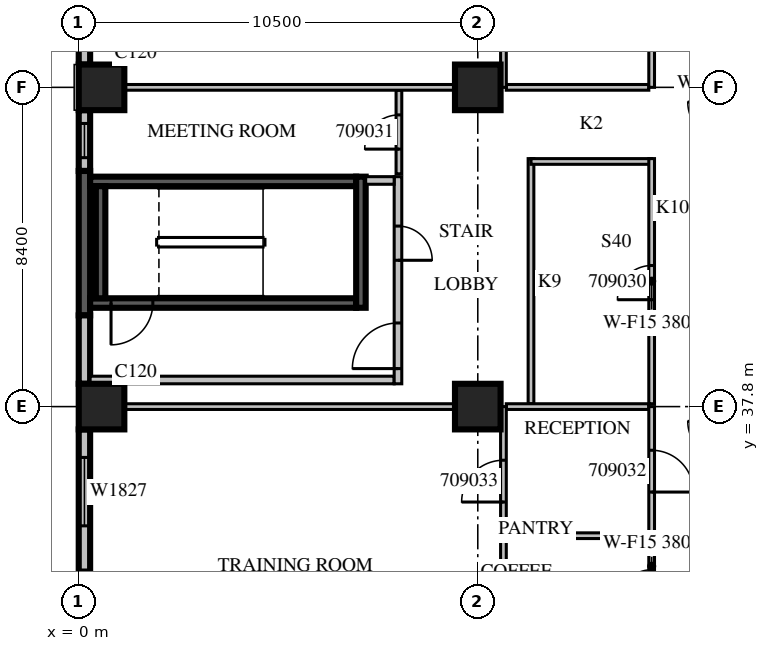
"""IFC4 building model, lengths in metres.
Left out: names, types, materials, properties, quantities, classifications, styles, units other than length and angle.
Written with IfcOpenShell. Run it as: python <this file> out.ifc"""

import sys

from ifc_helpers import new_model, si_unit, direction, frame, frame_2d, origin, origin_2d, place, context, subcontext, project, spatial, rectangle, extrude, source, transform, mapped, element, fill, save


model = new_model("IFC4")
c1 = context("Model", 3, precision=1e-05, world=origin(), true_north=direction((0.0, 1.0)))
c2 = subcontext(c1, "Body", "Model", "MODEL_VIEW")
j1 = project(units=[si_unit("LENGTHUNIT", "METRE"), si_unit("PLANEANGLEUNIT", "RADIAN")], contexts=[c1])
p1 = place(None, origin())
s1 = spatial("IfcSite", under=j1, at=p1, CompositionType="ELEMENT")
p2 = place(p1, origin())
s2 = spatial("IfcBuilding", under=s1, at=p2, CompositionType="ELEMENT")
p3 = place(p2, frame((0.0, 0.0, 48.9)))
s3 = spatial("IfcBuildingStorey", under=s2, at=p3, CompositionType="ELEMENT", Elevation=48.9)
m1 = source(origin(), c2, "Body", "SweptSolid", [
    extrude(rectangle(XDim=1.2, YDim=1.2, at=origin_2d()), origin(), (0.0, 0.0, 1.0), 4.2),
])
for number, where, z_axis, x_axis in (
    (1, (0.6, 37.8, 0.0), (0.0, 0.0, 1.0), (1.0, 0.0, 0.0)),
    (2, (10.5, 37.8, 0.0), (0.0, 0.0, 1.0), (1.0, 0.0, 0.0)),
    (3, (0.6, 46.2, 0.0), (0.0, 0.0, 1.0), (1.0, 0.0, 0.0)),
    (4, (10.5, 46.2, 0.0), (0.0, 0.0, 1.0), (1.0, 0.0, 0.0)),
):
    element("IfcColumn", number, at=place(p3, frame(where, z_axis=z_axis, x_axis=x_axis)), inside=s3, PredefinedType="COLUMN", context=c2, shape_type="MappedRepresentation", body=[
        mapped(m1, transform((0.0, 0.0, 0.0), scale=1.0)),
    ])
m2 = source(origin(), c2, "Body", "SweptSolid", [
    extrude(rectangle(XDim=4.68, YDim=0.3, at=frame_2d((2.34, 0.0))), origin(), (0.0, 0.0, 1.0), 3.8),
])
p4 = place(p3, frame((0.15, 51.48, 0.0), z_axis=(0.0, 0.0, 1.0), x_axis=(0.0, -1.0, 0.0)))
e5 = element("IfcWall", 5, at=p4, inside=s3, PredefinedType="STANDARD", context=c2, shape_type="MappedRepresentation", body=[
    mapped(m2, transform((0.0, 0.0, 0.0), scale=1.0)),
])
m3 = source(origin(), c2, "Body", "SweptSolid", [
    extrude(rectangle(XDim=1.6, YDim=0.3, at=frame_2d((0.8, 0.0))), origin(), (0.0, 0.0, 1.0), 3.8),
])
p5 = place(p3, frame((0.15, 45.6, 0.0), z_axis=(0.0, 0.0, 1.0), x_axis=(0.0, -1.0, 0.0)))
e6 = element("IfcWall", 6, at=p5, inside=s3, PredefinedType="STANDARD", context=c2, shape_type="MappedRepresentation", body=[
    mapped(m3, transform((0.0, 0.0, 0.0), scale=1.0)),
])
m4 = source(origin(), c2, "Body", "SweptSolid", [
    extrude(rectangle(XDim=0.9, YDim=2.7, at=frame_2d((0.45, 1.35))), frame((0.0, 0.16, 0.0), z_axis=(0.0, -1.0, 0.0), x_axis=(1.0, 0.0, 0.0)), (0.0, 0.0, 1.0), 0.32),
])
p6 = place(p5, frame((0.35, 0.0, 0.6)))
e7 = element("IfcOpeningElement", 7, at=p6, cuts=e6, PredefinedType="OPENING", context=c2, shape_type="MappedRepresentation", body=[
    mapped(m4, transform((0.0, 0.0, 0.0), scale=1.0)),
])
m5 = source(origin(), c2, "Body", "SweptSolid", [
    extrude(rectangle(XDim=3.8, YDim=0.3, at=frame_2d((1.9, 0.0))), origin(), (0.0, 0.0, 1.0), 3.8),
])
p7 = place(p3, frame((0.15, 44.0, 0.0), z_axis=(0.0, 0.0, 1.0), x_axis=(0.0, -1.0, 0.0)))
e8 = element("IfcWall", 8, at=p7, inside=s3, PredefinedType="SOLIDWALL", context=c2, shape_type="MappedRepresentation", body=[
    mapped(m5, transform((0.0, 0.0, 0.0), scale=1.0)),
])
m6 = source(origin(), c2, "Body", "SweptSolid", [
    extrude(rectangle(XDim=1.8, YDim=0.3, at=frame_2d((0.9, 0.0))), origin(), (0.0, 0.0, 1.0), 3.8),
])
p8 = place(p3, frame((0.15, 40.2, 0.0), z_axis=(0.0, 0.0, 1.0), x_axis=(0.0, -1.0, 0.0)))
e9 = element("IfcWall", 9, at=p8, inside=s3, PredefinedType="STANDARD", context=c2, shape_type="MappedRepresentation", body=[
    mapped(m6, transform((0.0, 0.0, 0.0), scale=1.0)),
])
m7 = source(origin(), c2, "Body", "SweptSolid", [
    extrude(rectangle(XDim=7.2, YDim=0.3, at=frame_2d((3.6, 0.0))), origin(), (0.0, 0.0, 1.0), 3.8),
])
p9 = place(p3, frame((0.15, 37.2, 0.0), z_axis=(0.0, 0.0, 1.0), x_axis=(0.0, -1.0, 0.0)))
e10 = element("IfcWall", 10, at=p9, inside=s3, PredefinedType="STANDARD", context=c2, shape_type="MappedRepresentation", body=[
    mapped(m7, transform((0.0, 0.0, 0.0), scale=1.0)),
])
m8 = source(origin(), c2, "Body", "SweptSolid", [
    extrude(rectangle(XDim=1.8, YDim=2.7, at=frame_2d((0.9, 1.35))), frame((0.0, 0.16, 0.0), z_axis=(0.0, -1.0, 0.0), x_axis=(1.0, 0.0, 0.0)), (0.0, 0.0, 1.0), 0.32),
])
p10 = place(p9, frame((0.738, 0.0, 0.6)))
e11 = element("IfcOpeningElement", 11, at=p10, cuts=e10, PredefinedType="OPENING", context=c2, shape_type="MappedRepresentation", body=[
    mapped(m8, transform((0.0, 0.0, 0.0), scale=1.0)),
])
m9 = source(origin(), c2, "Body", "SweptSolid", [
    extrude(rectangle(XDim=2.4, YDim=2.7, at=frame_2d((1.2, 1.35))), frame((0.0, 0.16, 0.0), z_axis=(0.0, -1.0, 0.0), x_axis=(1.0, 0.0, 0.0)), (0.0, 0.0, 1.0), 0.32),
])
p11 = place(p9, frame((3.7, 0.0, 0.6)))
e12 = element("IfcOpeningElement", 12, at=p11, cuts=e10, PredefinedType="OPENING", context=c2, shape_type="MappedRepresentation", body=[
    mapped(m9, transform((0.0, 0.0, 0.0), scale=1.0)),
])
m10 = source(origin(), c2, "Body", "SweptSolid", [
    extrude(rectangle(XDim=7.0, YDim=0.25, at=frame_2d((3.5, 0.0))), origin(), (0.0, 0.0, 1.0), 3.8),
])
p12 = place(p3, frame((0.3, 40.525, 0.0), z_axis=(0.0, 0.0, 1.0), x_axis=(1.0, 0.0, 0.0)))
e13 = element("IfcWall", 13, at=p12, inside=s3, PredefinedType="SOLIDWALL", context=c2, shape_type="MappedRepresentation", body=[
    mapped(m10, transform((0.0, 0.0, 0.0), scale=1.0)),
])
m11 = source(origin(), c2, "Body", "SweptSolid", [
    extrude(rectangle(XDim=1.1, YDim=2.1, at=frame_2d((0.55, 1.05))), frame((0.0, 0.135, 0.0), z_axis=(0.0, -1.0, 0.0), x_axis=(1.0, 0.0, 0.0)), (0.0, 0.0, 1.0), 0.27),
])
p13 = place(p12, frame((0.55, 0.0, 0.0)))
e14 = element("IfcOpeningElement", 14, at=p13, cuts=e13, PredefinedType="OPENING", context=c2, shape_type="MappedRepresentation", body=[
    mapped(m11, transform((0.0, 0.0, 0.0), scale=1.0)),
])
p14 = place(p3, frame((0.3, 43.725, 0.0), z_axis=(0.0, 0.0, 1.0), x_axis=(1.0, 0.0, 0.0)))
e15 = element("IfcWall", 15, at=p14, inside=s3, PredefinedType="SOLIDWALL", context=c2, shape_type="MappedRepresentation", body=[
    mapped(m10, transform((0.0, 0.0, 0.0), scale=1.0)),
])
m12 = source(origin(), c2, "Body", "SweptSolid", [
    extrude(rectangle(XDim=3.45, YDim=0.25, at=frame_2d((1.725, 0.0))), origin(), (0.0, 0.0, 1.0), 3.8),
])
p15 = place(p3, frame((7.425, 40.4, 0.0), z_axis=(0.0, 0.0, 1.0), x_axis=(0.0, 1.0, 0.0)))
e16 = element("IfcWall", 16, at=p15, inside=s3, PredefinedType="SOLIDWALL", context=c2, shape_type="MappedRepresentation", body=[
    mapped(m12, transform((0.0, 0.0, 0.0), scale=1.0)),
])
m13 = source(origin(), c2, "Body", "SweptSolid", [
    extrude(rectangle(XDim=2.95, YDim=0.25, at=frame_2d((1.475, 0.0))), origin(), (0.0, 0.0, 1.0), 3.8),
])
p16 = place(p3, frame((0.575, 40.65, 0.0), z_axis=(0.0, 0.0, 1.0), x_axis=(0.0, 1.0, 0.0)))
e17 = element("IfcWall", 17, at=p16, inside=s3, PredefinedType="SOLIDWALL", context=c2, shape_type="MappedRepresentation", body=[
    mapped(m13, transform((0.0, 0.0, 0.0), scale=1.0)),
])
m14 = source(origin(), c2, "Body", "SweptSolid", [
    extrude(rectangle(XDim=8.0, YDim=0.2, at=frame_2d((4.0, 0.0))), origin(), (0.0, 0.0, 1.0), 3.8),
])
p17 = place(p3, frame((0.3, 38.5, 0.0), z_axis=(0.0, 0.0, 1.0), x_axis=(1.0, 0.0, 0.0)))
e18 = element("IfcWall", 18, at=p17, inside=s3, PredefinedType="PARTITIONING", context=c2, shape_type="MappedRepresentation", body=[
    mapped(m14, transform((0.0, 0.0, 0.0), scale=1.0)),
])
m15 = source(origin(), c2, "Body", "SweptSolid", [
    extrude(rectangle(XDim=5.45, YDim=0.2, at=frame_2d((2.725, 0.0))), origin(), (0.0, 0.0, 1.0), 3.8),
])
p18 = place(p3, frame((8.4, 38.4, 0.0), z_axis=(0.0, 0.0, 1.0), x_axis=(0.0, 1.0, 0.0)))
e19 = element("IfcWall", 19, at=p18, inside=s3, PredefinedType="PARTITIONING", context=c2, shape_type="MappedRepresentation", body=[
    mapped(m15, transform((0.0, 0.0, 0.0), scale=1.0)),
])
m16 = source(origin(), c2, "Body", "SweptSolid", [
    extrude(rectangle(XDim=1.2, YDim=2.1, at=frame_2d((0.6, 1.05))), frame((0.0, 0.11, 0.0), z_axis=(0.0, -1.0, 0.0), x_axis=(1.0, 0.0, 0.0)), (0.0, 0.0, 1.0), 0.22),
])
p19 = place(p18, frame((0.4, 0.0, 0.0)))
e20 = element("IfcOpeningElement", 20, at=p19, cuts=e19, PredefinedType="OPENING", context=c2, shape_type="MappedRepresentation", body=[
    mapped(m16, transform((0.0, 0.0, 0.0), scale=1.0)),
])
m17 = source(origin(), c2, "Body", "SweptSolid", [
    extrude(rectangle(XDim=0.9, YDim=2.1, at=frame_2d((0.45, 1.05))), frame((0.0, 0.11, 0.0), z_axis=(0.0, -1.0, 0.0), x_axis=(1.0, 0.0, 0.0)), (0.0, 0.0, 1.0), 0.22),
])
p20 = place(p18, frame((3.25, 0.0, 0.0)))
e21 = element("IfcOpeningElement", 21, at=p20, cuts=e19, PredefinedType="OPENING", context=c2, shape_type="MappedRepresentation", body=[
    mapped(m17, transform((0.0, 0.0, 0.0), scale=1.0)),
])
m18 = source(origin(), c2, "Body", "SweptSolid", [
    extrude(rectangle(XDim=0.75, YDim=0.2, at=frame_2d((0.375, 0.0))), origin(), (0.0, 0.0, 1.0), 3.8),
])
p21 = place(p3, frame((7.55, 43.75, 0.0), z_axis=(0.0, 0.0, 1.0), x_axis=(1.0, 0.0, 0.0)))
e22 = element("IfcWall", 22, at=p21, inside=s3, PredefinedType="PARTITIONING", context=c2, shape_type="MappedRepresentation", body=[
    mapped(m18, transform((0.0, 0.0, 0.0), scale=1.0)),
])
m19 = source(origin(), c2, "Body", "SweptSolid", [
    extrude(rectangle(XDim=6.45, YDim=0.15, at=frame_2d((3.225, 0.0))), origin(), (0.0, 0.0, 1.0), 3.8),
])
p22 = place(p3, frame((11.9, 44.325, 0.0), z_axis=(0.0, 0.0, 1.0), x_axis=(0.0, -1.0, 0.0)))
e23 = element("IfcWall", 23, at=p22, inside=s3, PredefinedType="PARTITIONING", context=c2, shape_type="MappedRepresentation", body=[
    mapped(m19, transform((0.0, 0.0, 0.0), scale=1.0)),
])
p23 = place(p3, frame((15.075, 44.25, 0.0), z_axis=(0.0, 0.0, 1.0), x_axis=(-1.0, 0.0, 0.0)))
e24 = element("IfcWall", 24, at=p23, inside=s3, PredefinedType="PARTITIONING", context=c2, shape_type="SweptSolid", body=[
    extrude(rectangle(XDim=3.175, YDim=0.15, at=frame_2d((1.587, 0.0))), origin(), (0.0, 0.0, 1.0), 3.8),
])
p24 = place(p3, frame((15.075, 37.875, 0.0), z_axis=(0.0, 0.0, 1.0), x_axis=(0.0, 1.0, 0.0)))
e25 = element("IfcWall", 25, at=p24, inside=s3, PredefinedType="PARTITIONING", context=c2, shape_type="MappedRepresentation", body=[
    mapped(m19, transform((0.0, 0.0, 0.0), scale=1.0)),
])
m20 = source(origin(), c2, "Body", "SweptSolid", [
    extrude(rectangle(XDim=0.9, YDim=2.1, at=frame_2d((0.45, 1.05))), frame((0.0, 0.085, 0.0), z_axis=(0.0, -1.0, 0.0), x_axis=(1.0, 0.0, 0.0)), (0.0, 0.0, 1.0), 0.17),
])
p25 = place(p24, frame((2.737, 0.0, 0.0)))
e26 = element("IfcOpeningElement", 26, at=p25, cuts=e25, PredefinedType="OPENING", context=c2, shape_type="MappedRepresentation", body=[
    mapped(m20, transform((0.0, 0.0, 0.0), scale=1.0)),
])
m21 = source(origin(), c2, "Body", "SweptSolid", [
    extrude(rectangle(XDim=2.2, YDim=0.15, at=frame_2d((1.1, 0.0))), origin(), (0.0, 0.0, 1.0), 3.8),
])
p26 = place(p3, frame((8.425, 43.925, 0.0), z_axis=(0.0, 0.0, 1.0), x_axis=(0.0, 1.0, 0.0)))
e27 = element("IfcWall", 27, at=p26, inside=s3, PredefinedType="PARTITIONING", context=c2, shape_type="MappedRepresentation", body=[
    mapped(m21, transform((0.0, 0.0, 0.0), scale=1.0)),
])
p27 = place(p26, frame((0.65, 0.0, 0.0)))
e28 = element("IfcOpeningElement", 28, at=p27, cuts=e27, PredefinedType="OPENING", context=c2, shape_type="MappedRepresentation", body=[
    mapped(m20, transform((0.0, 0.0, 0.0), scale=1.0)),
])
m22 = source(origin(), c2, "Body", "SweptSolid", [
    extrude(rectangle(XDim=3.75, YDim=0.15, at=frame_2d((1.875, 0.0))), origin(), (0.0, 0.0, 1.0), 3.8),
])
p28 = place(p3, frame((15.0, 34.403, 0.0), z_axis=(0.0, 0.0, 1.0), x_axis=(-1.0, 0.0, 0.0)))
e29 = element("IfcWall", 29, at=p28, inside=s3, PredefinedType="PARTITIONING", context=c2, shape_type="MappedRepresentation", body=[
    mapped(m22, transform((0.0, 0.0, 0.0), scale=1.0)),
])
m23 = source(origin(), c2, "Body", "SweptSolid", [
    extrude(rectangle(XDim=8.702, YDim=0.15, at=frame_2d((4.351, 0.0))), origin(), (0.0, 0.0, 1.0), 3.8),
])
p29 = place(p3, frame((9.901, 37.8, 0.0), z_axis=(0.0, 0.0, 1.0), x_axis=(-1.0, 0.0, 0.0)))
e30 = element("IfcWall", 30, at=p29, inside=s3, PredefinedType="PARTITIONING", context=c2, shape_type="MappedRepresentation", body=[
    mapped(m23, transform((0.0, 0.0, 0.0), scale=1.0)),
])
p30 = place(p3, frame((15.0, 37.8, 0.0), z_axis=(0.0, 0.0, 1.0), x_axis=(-1.0, 0.0, 0.0)))
e31 = element("IfcWall", 31, at=p30, inside=s3, PredefinedType="PARTITIONING", context=c2, shape_type="MappedRepresentation", body=[
    mapped(m22, transform((0.0, 0.0, 0.0), scale=1.0)),
])
m24 = source(origin(), c2, "Body", "SweptSolid", [
    extrude(rectangle(XDim=8.4, YDim=0.15, at=frame_2d((4.2, 0.0))), origin(), (0.0, 0.0, 1.0), 3.8),
])
p31 = place(p3, frame((11.175, 29.4, 0.0), z_axis=(0.0, 0.0, 1.0), x_axis=(0.0, 1.0, 0.0)))
e32 = element("IfcWall", 32, at=p31, inside=s3, PredefinedType="PARTITIONING", context=c2, shape_type="MappedRepresentation", body=[
    mapped(m24, transform((0.0, 0.0, 0.0), scale=1.0)),
])
m25 = source(origin(), c2, "Body", "SweptSolid", [
    extrude(rectangle(XDim=1.1, YDim=2.1, at=frame_2d((0.55, 1.05))), frame((0.0, 0.085, 0.0), z_axis=(0.0, -1.0, 0.0), x_axis=(1.0, 0.0, 0.0)), (0.0, 0.0, 1.0), 0.17),
])
p32 = place(p31, frame((5.889, 0.0, 0.0)))
e33 = element("IfcOpeningElement", 33, at=p32, cuts=e32, PredefinedType="OPENING", context=c2, shape_type="MappedRepresentation", body=[
    mapped(m25, transform((0.0, 0.0, 0.0), scale=1.0)),
])
p33 = place(p3, frame((9.901, 46.2, 0.0), z_axis=(0.0, 0.0, 1.0), x_axis=(-1.0, 0.0, 0.0)))
e34 = element("IfcWall", 34, at=p33, inside=s3, PredefinedType="PARTITIONING", context=c2, shape_type="MappedRepresentation", body=[
    mapped(m23, transform((0.0, 0.0, 0.0), scale=1.0)),
])
p34 = place(p3, frame((15.0, 46.2, 0.0), z_axis=(0.0, 0.0, 1.0), x_axis=(-1.0, 0.0, 0.0)))
e35 = element("IfcWall", 35, at=p34, inside=s3, PredefinedType="PARTITIONING", context=c2, shape_type="MappedRepresentation", body=[
    mapped(m22, transform((0.0, 0.0, 0.0), scale=1.0)),
])
m26 = source(origin(), c2, "Body", "SweptSolid", [
    extrude(rectangle(XDim=19.02, YDim=0.15, at=frame_2d((9.51, 0.0))), origin(), (0.0, 0.0, 1.0), 3.8),
])
p35 = place(p3, frame((11.175, 46.2, 0.0), z_axis=(0.0, 0.0, 1.0), x_axis=(0.0, 1.0, 0.0)))
e36 = element("IfcWall", 36, at=p35, inside=s3, PredefinedType="PARTITIONING", context=c2, shape_type="MappedRepresentation", body=[
    mapped(m26, transform((0.0, 0.0, 0.0), scale=1.0)),
])
p36 = place(p35, frame((13.412, 0.0, 0.0)))
e37 = element("IfcOpeningElement", 37, at=p36, cuts=e36, PredefinedType="OPENING", context=c2, shape_type="MappedRepresentation", body=[
    mapped(m25, transform((0.0, 0.0, 0.0), scale=1.0)),
])
p37 = place(p35, frame((15.777, 0.0, 0.0)))
e38 = element("IfcOpeningElement", 38, at=p37, cuts=e36, PredefinedType="OPENING", context=c2, shape_type="MappedRepresentation", body=[
    mapped(m25, transform((0.0, 0.0, 0.0), scale=1.0)),
])
p38 = place(p3, frame((15.075, 29.4, 0.0), z_axis=(0.0, 0.0, 1.0), x_axis=(0.0, 1.0, 0.0)))
e39 = element("IfcWall", 39, at=p38, inside=s3, PredefinedType="PARTITIONING", context=c2, shape_type="MappedRepresentation", body=[
    mapped(m24, transform((0.0, 0.0, 0.0), scale=1.0)),
])
p39 = place(p38, frame((6.152, 0.0, 0.0)))
e40 = element("IfcOpeningElement", 40, at=p39, cuts=e39, PredefinedType="OPENING", context=c2, shape_type="MappedRepresentation", body=[
    mapped(m25, transform((0.0, 0.0, 0.0), scale=1.0)),
])
p40 = place(p38, frame((0.705, 0.0, 0.0)))
e41 = element("IfcOpeningElement", 41, at=p40, cuts=e39, PredefinedType="OPENING", context=c2, shape_type="MappedRepresentation", body=[
    mapped(m20, transform((0.0, 0.0, 0.0), scale=1.0)),
])
p41 = place(p38, frame((3.207, 0.0, 0.0)))
e42 = element("IfcOpeningElement", 42, at=p41, cuts=e39, PredefinedType="OPENING", context=c2, shape_type="MappedRepresentation", body=[
    mapped(m20, transform((0.0, 0.0, 0.0), scale=1.0)),
])
p42 = place(p3, frame((15.075, 46.2, 0.0), z_axis=(0.0, 0.0, 1.0), x_axis=(0.0, 1.0, 0.0)))
e43 = element("IfcWall", 43, at=p42, inside=s3, PredefinedType="PARTITIONING", context=c2, shape_type="MappedRepresentation", body=[
    mapped(m26, transform((0.0, 0.0, 0.0), scale=1.0)),
])
p43 = place(p42, frame((13.1, 0.0, 0.0)))
e44 = element("IfcOpeningElement", 44, at=p43, cuts=e43, PredefinedType="OPENING", context=c2, shape_type="MappedRepresentation", body=[
    mapped(m25, transform((0.0, 0.0, 0.0), scale=1.0)),
])
p44 = place(p42, frame((2.49, 0.0, 0.0)))
e45 = element("IfcOpeningElement", 45, at=p44, cuts=e43, PredefinedType="OPENING", context=c2, shape_type="MappedRepresentation", body=[
    mapped(m20, transform((0.0, 0.0, 0.0), scale=1.0)),
])
p45 = place(p42, frame((8.37, 0.0, 0.0)))
e46 = element("IfcOpeningElement", 46, at=p45, cuts=e43, PredefinedType="OPENING", context=c2, shape_type="MappedRepresentation", body=[
    mapped(m20, transform((0.0, 0.0, 0.0), scale=1.0)),
])
p46 = place(p42, frame((16.767, 0.0, 0.0)))
e47 = element("IfcOpeningElement", 47, at=p46, cuts=e43, PredefinedType="OPENING", context=c2, shape_type="MappedRepresentation", body=[
    mapped(m25, transform((0.0, 0.0, 0.0), scale=1.0)),
])
m27 = source(origin(), c2, "Body", "SweptSolid", [
    extrude(rectangle(XDim=0.9, YDim=2.7, at=frame_2d((0.45, 1.35))), frame((0.0, 0.03, 0.0), z_axis=(0.0, -1.0, 0.0), x_axis=(1.0, 0.0, 0.0)), (0.0, 0.0, 1.0), 0.06),
])
p47 = place(p6, origin())
e48 = element("IfcWindow", 48, at=p47, inside=s3, PartitioningType="SINGLE_PANEL", PredefinedType="WINDOW", context=c2, shape_type="MappedRepresentation", body=[
    mapped(m27, transform((0.0, 0.0, 0.0), scale=1.0)),
])
fill(e7, e48)
m28 = source(origin(), c2, "Body", "SweptSolid", [
    extrude(rectangle(XDim=1.8, YDim=2.7, at=frame_2d((0.9, 1.35))), frame((0.0, 0.03, 0.0), z_axis=(0.0, -1.0, 0.0), x_axis=(1.0, 0.0, 0.0)), (0.0, 0.0, 1.0), 0.06),
])
p48 = place(p10, origin())
e49 = element("IfcWindow", 49, at=p48, inside=s3, PartitioningType="SINGLE_PANEL", PredefinedType="WINDOW", context=c2, shape_type="MappedRepresentation", body=[
    mapped(m28, transform((0.0, 0.0, 0.0), scale=1.0)),
])
fill(e11, e49)
m29 = source(origin(), c2, "Body", "SweptSolid", [
    extrude(rectangle(XDim=2.4, YDim=2.7, at=frame_2d((1.2, 1.35))), frame((0.0, 0.03, 0.0), z_axis=(0.0, -1.0, 0.0), x_axis=(1.0, 0.0, 0.0)), (0.0, 0.0, 1.0), 0.06),
])
p49 = place(p11, origin())
e50 = element("IfcWindow", 50, at=p49, inside=s3, PartitioningType="SINGLE_PANEL", PredefinedType="WINDOW", context=c2, shape_type="MappedRepresentation", body=[
    mapped(m29, transform((0.0, 0.0, 0.0), scale=1.0)),
])
fill(e12, e50)
m30 = source(origin(), c2, "Body", "SweptSolid", [
    extrude(rectangle(XDim=1.1, YDim=2.1, at=frame_2d((0.55, 1.05))), frame((0.0, 0.025, 0.0), z_axis=(0.0, -1.0, 0.0), x_axis=(1.0, 0.0, 0.0)), (0.0, 0.0, 1.0), 0.05),
])
p50 = place(p13, origin())
e51 = element("IfcDoor", 51, at=p50, inside=s3, OperationType="SINGLE_SWING_RIGHT", PredefinedType="DOOR", context=c2, shape_type="MappedRepresentation", body=[
    mapped(m30, transform((0.0, 0.0, 0.0), scale=1.0)),
])
fill(e14, e51)
m31 = source(origin(), c2, "Body", "SweptSolid", [
    extrude(rectangle(XDim=1.2, YDim=2.1, at=frame_2d((0.6, 1.05))), frame((0.0, 0.025, 0.0), z_axis=(0.0, -1.0, 0.0), x_axis=(1.0, 0.0, 0.0)), (0.0, 0.0, 1.0), 0.05),
])
p51 = place(p19, origin())
e52 = element("IfcDoor", 52, at=p51, inside=s3, OperationType="SINGLE_SWING_LEFT", PredefinedType="DOOR", context=c2, shape_type="MappedRepresentation", body=[
    mapped(m31, transform((0.0, 0.0, 0.0), scale=1.0)),
])
fill(e20, e52)
m32 = source(origin(), c2, "Body", "SweptSolid", [
    extrude(rectangle(XDim=0.9, YDim=2.1, at=frame_2d((0.45, 1.05))), frame((0.0, 0.025, 0.0), z_axis=(0.0, -1.0, 0.0), x_axis=(1.0, 0.0, 0.0)), (0.0, 0.0, 1.0), 0.05),
])
p52 = place(p20, origin())
e53 = element("IfcDoor", 53, at=p52, inside=s3, OperationType="SINGLE_SWING_RIGHT", PredefinedType="DOOR", context=c2, shape_type="MappedRepresentation", body=[
    mapped(m32, transform((0.0, 0.0, 0.0), scale=1.0)),
])
fill(e21, e53)
p53 = place(p25, origin())
e54 = element("IfcDoor", 54, at=p53, inside=s3, OperationType="SINGLE_SWING_LEFT", PredefinedType="DOOR", context=c2, shape_type="MappedRepresentation", body=[
    mapped(m32, transform((0.0, 0.0, 0.0), scale=1.0)),
])
fill(e26, e54)
p54 = place(p27, origin())
e55 = element("IfcDoor", 55, at=p54, inside=s3, OperationType="SINGLE_SWING_LEFT", PredefinedType="DOOR", context=c2, shape_type="MappedRepresentation", body=[
    mapped(m32, transform((0.0, 0.0, 0.0), scale=1.0)),
])
fill(e28, e55)
p55 = place(p39, origin())
e56 = element("IfcDoor", 56, at=p55, inside=s3, OperationType="SINGLE_SWING_RIGHT", PredefinedType="DOOR", context=c2, shape_type="MappedRepresentation", body=[
    mapped(m30, transform((0.0, 0.0, 0.0), scale=1.0)),
])
fill(e40, e56)
p56 = place(p32, origin())
e57 = element("IfcDoor", 57, at=p56, inside=s3, OperationType="SINGLE_SWING_LEFT", PredefinedType="DOOR", context=c2, shape_type="MappedRepresentation", body=[
    mapped(m30, transform((0.0, 0.0, 0.0), scale=1.0)),
])
fill(e33, e57)
p57 = place(p41, origin())
e58 = element("IfcDoor", 58, at=p57, inside=s3, OperationType="SINGLE_SWING_LEFT", PredefinedType="DOOR", context=c2, shape_type="MappedRepresentation", body=[
    mapped(m32, transform((0.0, 0.0, 0.0), scale=1.0)),
])
fill(e42, e58)
save(model, sys.argv[1])
